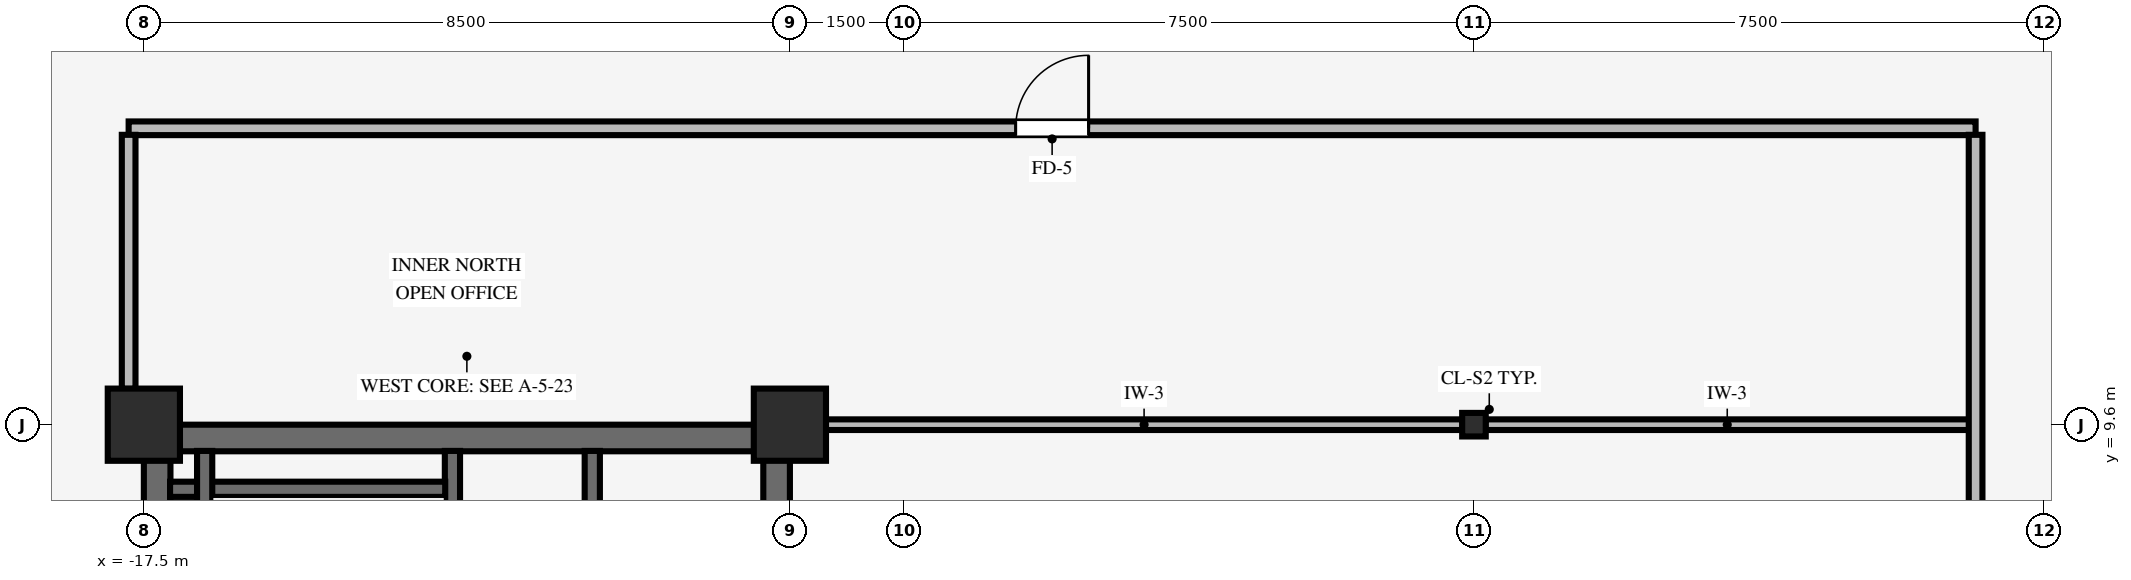
"""IFC4 building model, lengths in metres.
Left out: names, types, materials, properties, quantities, classifications, styles, units other than length and angle.
Written with IfcOpenShell. Run it as: python <this file> out.ifc"""

import sys

from ifc_helpers import new_model, si_unit, direction, frame, frame_2d, origin, origin_2d, place, context, subcontext, project, spatial, rectangle, i_section, extrude, source, transform, mapped, element, fill, save


model = new_model("IFC4")
c1 = context("Model", 3, precision=1e-05, world=origin(), true_north=direction((0.0, 1.0)))
c2 = subcontext(c1, "Body", "Model", "MODEL_VIEW")
j1 = project(units=[si_unit("LENGTHUNIT", "METRE"), si_unit("PLANEANGLEUNIT", "RADIAN")], contexts=[c1])
p1 = place(None, origin())
s1 = spatial("IfcSite", under=j1, at=p1, CompositionType="ELEMENT")
p2 = place(p1, origin())
s2 = spatial("IfcBuilding", under=s1, at=p2, CompositionType="ELEMENT")
p3 = place(p2, frame((0.0, 0.0, 205.5)))
s3 = spatial("IfcBuildingStorey", under=s2, at=p3, CompositionType="ELEMENT", Elevation=205.5)
p4 = place(p3, frame((-17.5, 9.425, 0.0), z_axis=(0.0, 0.0, 1.0), x_axis=(1.0, 0.0, 0.0)))
e1 = element("IfcWall", 1, at=p4, inside=s3, PredefinedType="SHEAR", context=c2, shape_type="SweptSolid", body=[
    extrude(rectangle(XDim=8.5, YDim=0.35, at=frame_2d((4.25, 0.0))), origin(), (0.0, 0.0, 1.0), 3.25),
])
p5 = place(p3, frame((-17.325, -9.255, 0.0), z_axis=(0.0, 0.0, 1.0), x_axis=(0.0, 1.0, 0.0)))
e2 = element("IfcWall", 2, at=p5, inside=s3, PredefinedType="SHEAR", context=c2, shape_type="SweptSolid", body=[
    extrude(rectangle(XDim=18.51, YDim=0.35, at=frame_2d((9.255, 0.0))), origin(), (0.0, 0.0, 1.0), 3.25),
])
p6 = place(p3, frame((-9.175, -9.255, 0.0), z_axis=(0.0, 0.0, 1.0), x_axis=(0.0, 1.0, 0.0)))
e3 = element("IfcWall", 3, at=p6, inside=s3, PredefinedType="SHEAR", context=c2, shape_type="SweptSolid", body=[
    extrude(rectangle(XDim=18.51, YDim=0.35, at=frame_2d((9.255, 0.0))), origin(), (0.0, 0.0, 1.0), 3.25),
])
p7 = place(p6, frame((8.655, 0.0, 0.0)))
e4 = element("IfcOpeningElement", 4, at=p7, cuts=e3, PredefinedType="OPENING", context=c2, shape_type="SweptSolid", body=[
    extrude(rectangle(XDim=1.2, YDim=2.15, at=frame_2d((0.6, 1.075))), frame((0.0, 0.185, 0.0), z_axis=(0.0, -1.0, 0.0), x_axis=(1.0, 0.0, 0.0)), (0.0, 0.0, 1.0), 0.37),
])
for number, where, z_axis, x_axis in (
    (5, (-17.5, 9.6, 0.0), (0.0, 0.0, 1.0), (1.0, 0.0, 0.0)),
    (6, (-9.0, 9.6, 0.0), (0.0, 0.0, 1.0), (1.0, 0.0, 0.0)),
):
    element("IfcColumn", number, at=place(p3, frame(where, z_axis=z_axis, x_axis=x_axis)), inside=s3, PredefinedType="COLUMN", context=c2, shape_type="SweptSolid", body=[
        extrude(rectangle(XDim=0.95, YDim=0.95, at=origin_2d()), origin(), (0.0, 0.0, 1.0), 3.25),
    ])
p8 = place(p3, frame((0.0, 9.6, 0.0), z_axis=(0.0, 0.0, 1.0), x_axis=(1.0, 0.0, 0.0)))
e7 = element("IfcColumn", 7, at=p8, inside=s3, PredefinedType="COLUMN", context=c2, shape_type="SweptSolid", body=[
    extrude(i_section(OverallWidth=0.31, OverallDepth=0.31, WebThickness=0.015, FlangeThickness=0.015, FilletRadius=0.015, at=origin_2d()), origin(), (0.0, 0.0, 1.0), 3.25),
])
p9 = place(p3, frame((-13.44, 0.9, 0.0), z_axis=(0.0, 0.0, 1.0), x_axis=(0.0, 1.0, 0.0)))
e8 = element("IfcWall", 8, at=p9, inside=s3, PredefinedType="SHEAR", context=c2, shape_type="SweptSolid", body=[
    extrude(rectangle(XDim=8.355, YDim=0.2, at=frame_2d((4.177, 0.0))), origin(), (0.0, 0.0, 1.0), 3.25),
])
p10 = place(p9, frame((1.53, 0.0, 0.0), z_axis=(0.0, 0.0, 1.0), x_axis=(-1.0, 0.0, 0.0)))
e9 = element("IfcOpeningElement", 9, at=p10, cuts=e8, PredefinedType="OPENING", context=c2, shape_type="SweptSolid", body=[
    extrude(rectangle(XDim=1.1, YDim=2.15, at=frame_2d((0.55, 1.075))), frame((0.0, 0.11, 0.0), z_axis=(0.0, -1.0, 0.0), x_axis=(1.0, 0.0, 0.0)), (0.0, 0.0, 1.0), 0.22),
])
p11 = place(p3, frame((-17.155, 8.75, 0.0), z_axis=(0.0, 0.0, 1.0), x_axis=(1.0, 0.0, 0.0)))
e10 = element("IfcWall", 10, at=p11, inside=s3, PredefinedType="SHEAR", context=c2, shape_type="SweptSolid", body=[
    extrude(rectangle(XDim=3.62, YDim=0.2, at=frame_2d((1.81, 0.0))), origin(), (0.0, 0.0, 1.0), 3.25),
])
p12 = place(p3, frame((-16.7, 1.095, 0.0), z_axis=(0.0, 0.0, 1.0), x_axis=(0.0, 1.0, 0.0)))
e11 = element("IfcWall", 11, at=p12, inside=s3, PredefinedType="SHEAR", context=c2, shape_type="SweptSolid", body=[
    extrude(rectangle(XDim=8.16, YDim=0.2, at=frame_2d((4.08, 0.0))), origin(), (0.0, 0.0, 1.0), 3.25),
])
p13 = place(p3, frame((-11.6, 1.3, 0.0), z_axis=(0.0, 0.0, 1.0), x_axis=(0.0, 1.0, 0.0)))
e12 = element("IfcWall", 12, at=p13, inside=s3, PredefinedType="SHEAR", context=c2, shape_type="SweptSolid", body=[
    extrude(rectangle(XDim=7.955, YDim=0.2, at=frame_2d((3.978, 0.0))), origin(), (0.0, 0.0, 1.0), 3.25),
])
p14 = place(p3, frame((-8.529, 9.6, 0.0), z_axis=(0.0, 0.0, 1.0), x_axis=(1.0, 0.0, 0.0)))
e13 = element("IfcWall", 13, at=p14, inside=s3, PredefinedType="PARTITIONING", context=c2, shape_type="SweptSolid", body=[
    extrude(rectangle(XDim=8.378, YDim=0.14, at=frame_2d((4.189, 0.0))), origin(), (0.0, 0.0, 1.0), 2.285),
])
p15 = place(p3, frame((0.151, 9.6, 0.0), z_axis=(0.0, 0.0, 1.0), x_axis=(1.0, 0.0, 0.0)))
e14 = element("IfcWall", 14, at=p15, inside=s3, PredefinedType="PARTITIONING", context=c2, shape_type="SweptSolid", body=[
    extrude(rectangle(XDim=6.363, YDim=0.14, at=frame_2d((3.182, 0.0))), origin(), (0.0, 0.0, 1.0), 2.285),
])
p16 = place(p3, frame((-17.7, 13.5, 0.0), z_axis=(0.0, 0.0, 1.0), x_axis=(1.0, 0.0, 0.0)))
e15 = element("IfcWall", 15, at=p16, inside=s3, PredefinedType="PARTITIONING", context=c2, shape_type="SweptSolid", body=[
    extrude(rectangle(XDim=24.3, YDim=0.18, at=frame_2d((12.15, 0.0))), origin(), (0.0, 0.0, 1.0), 2.888),
])
p17 = place(p16, frame((11.67, 0.0, 0.0)))
e16 = element("IfcOpeningElement", 16, at=p17, cuts=e15, PredefinedType="OPENING", context=c2, shape_type="SweptSolid", body=[
    extrude(rectangle(XDim=0.96, YDim=2.1, at=frame_2d((0.48, 1.05))), frame((0.0, 0.1, 0.0), z_axis=(0.0, -1.0, 0.0), x_axis=(1.0, 0.0, 0.0)), (0.0, 0.0, 1.0), 0.2),
])
p18 = place(p3, frame((-17.7, 10.071, 0.0), z_axis=(0.0, 0.0, 1.0), x_axis=(0.0, 1.0, 0.0)))
e17 = element("IfcWall", 17, at=p18, inside=s3, PredefinedType="PARTITIONING", context=c2, shape_type="SweptSolid", body=[
    extrude(rectangle(XDim=3.343, YDim=0.18, at=frame_2d((1.671, 0.0))), origin(), (0.0, 0.0, 1.0), 2.696),
])
p19 = place(p3, frame((6.6, 1.336, 0.0), z_axis=(0.0, 0.0, 1.0), x_axis=(0.0, 1.0, 0.0)))
e18 = element("IfcWall", 18, at=p19, inside=s3, PredefinedType="PARTITIONING", context=c2, shape_type="SweptSolid", body=[
    extrude(rectangle(XDim=12.078, YDim=0.18, at=frame_2d((6.039, 0.0))), origin(), (0.0, 0.0, 1.0), 3.24),
])
m1 = source(origin(), c2, "Body", "SweptSolid", [
    extrude(rectangle(XDim=0.96, YDim=2.1, at=frame_2d((0.48, 1.05))), frame((0.0, 0.025, 0.0), z_axis=(0.0, -1.0, 0.0), x_axis=(1.0, 0.0, 0.0)), (0.0, 0.0, 1.0), 0.05),
])
p20 = place(p17, origin())
e19 = element("IfcDoor", 19, at=p20, inside=s3, OperationType="SINGLE_SWING_RIGHT", PredefinedType="DOOR", context=c2, shape_type="MappedRepresentation", body=[
    mapped(m1, transform((0.0, 0.0, 0.0), scale=1.0)),
])
fill(e16, e19)
save(model, sys.argv[1])
